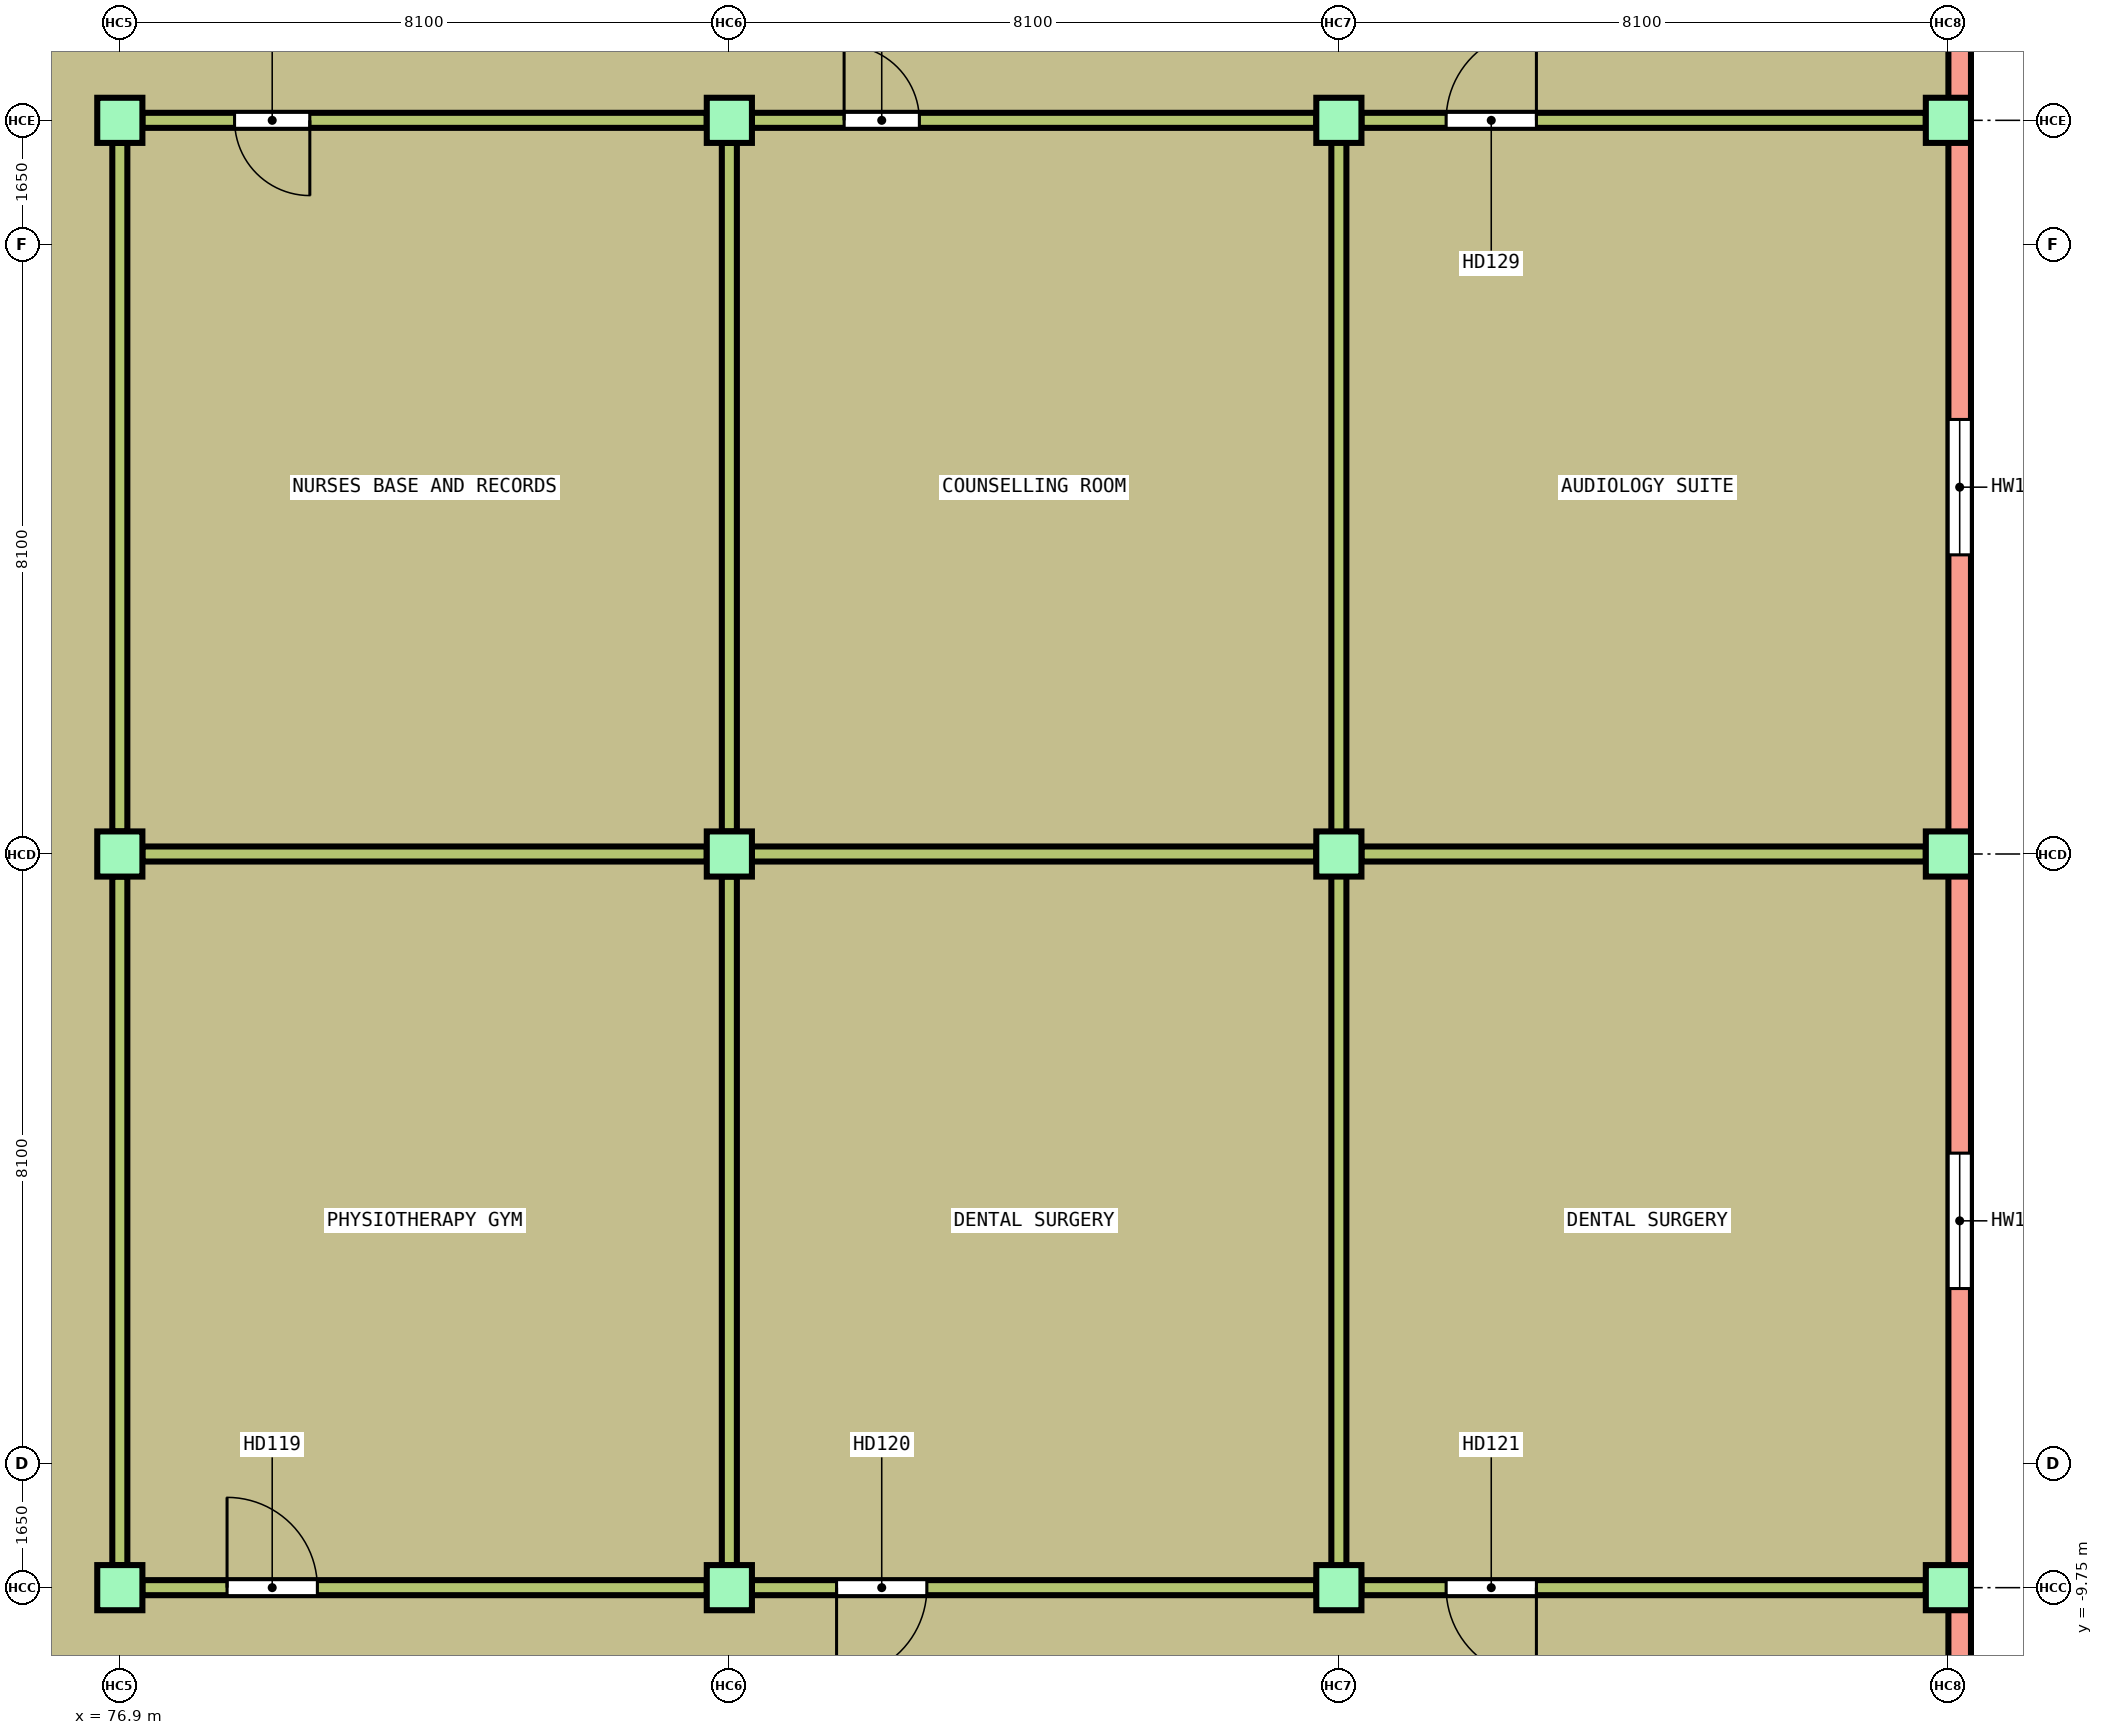
"""IFC4 building model, lengths in metres.
Left out: names, types, materials, properties, quantities, classifications, styles, units other than length and angle.
Written with IfcOpenShell. Run it as: python <this file> out.ifc"""

import sys

from ifc_helpers import new_model, si_unit, direction, frame, frame_2d, origin, origin_2d, place, context, subcontext, project, spatial, rectangle, extrude, element, fill, save


model = new_model("IFC4")
c1 = context("Model", 3, precision=1e-05, world=origin(), true_north=direction((0.0, 1.0)))
c2 = subcontext(c1, "Body", "Model", "MODEL_VIEW")
j1 = project(units=[si_unit("LENGTHUNIT", "METRE"), si_unit("PLANEANGLEUNIT", "RADIAN")], contexts=[c1])
p1 = place(None, origin())
s1 = spatial("IfcSite", under=j1, at=p1, CompositionType="ELEMENT")
p2 = place(p1, origin())
s2 = spatial("IfcBuilding", under=s1, at=p2, CompositionType="ELEMENT")
p3 = place(p2, frame((0.0, 0.0, 5.6)))
s3 = spatial("IfcBuildingStorey", under=s2, at=p3, CompositionType="ELEMENT", Elevation=5.6)
for number, where, z_axis, x_axis in (
    (1, (76.9, -9.75, 0.0), (0.0, 0.0, 1.0), (1.0, 0.0, 0.0)),
    (2, (85.0, -9.75, 0.0), (0.0, 0.0, 1.0), (1.0, 0.0, 0.0)),
    (3, (93.1, -9.75, 0.0), (0.0, 0.0, 1.0), (1.0, 0.0, 0.0)),
    (4, (101.2, -9.75, 0.0), (0.0, 0.0, 1.0), (1.0, 0.0, 0.0)),
    (5, (76.9, 0.0, 0.0), (0.0, 0.0, 1.0), (1.0, 0.0, 0.0)),
    (6, (85.0, 0.0, 0.0), (0.0, 0.0, 1.0), (1.0, 0.0, 0.0)),
    (7, (93.1, 0.0, 0.0), (0.0, 0.0, 1.0), (1.0, 0.0, 0.0)),
    (8, (101.2, 0.0, 0.0), (0.0, 0.0, 1.0), (1.0, 0.0, 0.0)),
    (9, (76.9, 9.75, 0.0), (0.0, 0.0, 1.0), (1.0, 0.0, 0.0)),
    (10, (85.0, 9.75, 0.0), (0.0, 0.0, 1.0), (1.0, 0.0, 0.0)),
    (11, (93.1, 9.75, 0.0), (0.0, 0.0, 1.0), (1.0, 0.0, 0.0)),
    (12, (101.2, 9.75, 0.0), (0.0, 0.0, 1.0), (1.0, 0.0, 0.0)),
):
    element("IfcColumn", number, at=place(p3, frame(where, z_axis=z_axis, x_axis=x_axis)), inside=s3, PredefinedType="COLUMN", context=c2, shape_type="SweptSolid", body=[
        extrude(rectangle(XDim=0.6, YDim=0.6, at=origin_2d()), origin(), (0.0, 0.0, 1.0), 4.6),
    ])
for number, where, z_axis, x_axis in (
    (13, (76.9, -9.45, 0.0), (0.0, 0.0, 1.0), (0.0, 1.0, 0.0)),
    (14, (76.9, 0.3, 0.0), (0.0, 0.0, 1.0), (0.0, 1.0, 0.0)),
    (15, (85.0, -9.45, 0.0), (0.0, 0.0, 1.0), (0.0, 1.0, 0.0)),
    (16, (85.0, 0.3, 0.0), (0.0, 0.0, 1.0), (0.0, 1.0, 0.0)),
):
    element("IfcWall", number, at=place(p3, frame(where, z_axis=z_axis, x_axis=x_axis)), inside=s3, PredefinedType="PARTITIONING", context=c2, shape_type="SweptSolid", body=[
        extrude(rectangle(XDim=9.15, YDim=0.2, at=frame_2d((4.575, 0.0))), origin(), (0.0, 0.0, 1.0), 3.8),
    ])
p4 = place(p3, frame((93.1, -9.75, 0.0), z_axis=(0.0, 0.0, 1.0), x_axis=(0.0, 1.0, 0.0)))
e17 = element("IfcWall", 17, at=p4, inside=s3, PredefinedType="PARTITIONING", context=c2, shape_type="SweptSolid", body=[
    extrude(rectangle(XDim=19.5, YDim=0.2, at=frame_2d((9.75, 0.0))), origin(), (0.0, 0.0, 1.0), 3.8),
])
p5 = place(p3, frame((101.35, 20.25, 0.0), z_axis=(0.0, 0.0, 1.0), x_axis=(0.0, -1.0, 0.0)))
e18 = element("IfcWall", 18, at=p5, inside=s3, PredefinedType="SOLIDWALL", context=c2, shape_type="SweptSolid", body=[
    extrude(rectangle(XDim=40.5, YDim=0.3, at=frame_2d((20.25, 0.0))), origin(), (0.0, 0.0, 1.0), 3.8),
])
p6 = place(p5, frame((36.15, 0.0, 1.5)))
e19 = element("IfcOpeningElement", 19, at=p6, cuts=e18, PredefinedType="OPENING", context=c2, shape_type="SweptSolid", body=[
    extrude(rectangle(XDim=1.2, YDim=0.9, at=frame_2d((0.6, 0.45))), frame((0.0, 0.16, 0.0), z_axis=(0.0, -1.0, 0.0), x_axis=(1.0, 0.0, 0.0)), (0.0, 0.0, 1.0), 0.32),
])
p7 = place(p5, frame((24.225, 0.0, 0.9)))
e20 = element("IfcOpeningElement", 20, at=p7, cuts=e18, PredefinedType="OPENING", context=c2, shape_type="SweptSolid", body=[
    extrude(rectangle(XDim=1.8, YDim=1.8, at=frame_2d((0.9, 0.9))), frame((0.0, 0.16, 0.0), z_axis=(0.0, -1.0, 0.0), x_axis=(1.0, 0.0, 0.0)), (0.0, 0.0, 1.0), 0.32),
])
p8 = place(p5, frame((14.475, 0.0, 0.9)))
e21 = element("IfcOpeningElement", 21, at=p8, cuts=e18, PredefinedType="OPENING", context=c2, shape_type="SweptSolid", body=[
    extrude(rectangle(XDim=1.8, YDim=1.8, at=frame_2d((0.9, 0.9))), frame((0.0, 0.16, 0.0), z_axis=(0.0, -1.0, 0.0), x_axis=(1.0, 0.0, 0.0)), (0.0, 0.0, 1.0), 0.32),
])
p9 = place(p3, frame((77.2, -9.75, 0.0), z_axis=(0.0, 0.0, 1.0), x_axis=(1.0, 0.0, 0.0)))
e22 = element("IfcWall", 22, at=p9, inside=s3, PredefinedType="PARTITIONING", context=c2, shape_type="SweptSolid", body=[
    extrude(rectangle(XDim=7.5, YDim=0.2, at=frame_2d((3.75, 0.0))), origin(), (0.0, 0.0, 1.0), 3.8),
])
p10 = place(p9, frame((1.125, 0.0, 0.0)))
e23 = element("IfcOpeningElement", 23, at=p10, cuts=e22, PredefinedType="OPENING", context=c2, shape_type="SweptSolid", body=[
    extrude(rectangle(XDim=1.2, YDim=2.1, at=frame_2d((0.6, 1.05))), frame((0.0, 0.11, 0.0), z_axis=(0.0, -1.0, 0.0), x_axis=(1.0, 0.0, 0.0)), (0.0, 0.0, 1.0), 0.22),
])
p11 = place(p3, frame((85.3, -9.75, 0.0), z_axis=(0.0, 0.0, 1.0), x_axis=(1.0, 0.0, 0.0)))
e24 = element("IfcWall", 24, at=p11, inside=s3, PredefinedType="PARTITIONING", context=c2, shape_type="SweptSolid", body=[
    extrude(rectangle(XDim=7.5, YDim=0.2, at=frame_2d((3.75, 0.0))), origin(), (0.0, 0.0, 1.0), 3.8),
])
p12 = place(p11, frame((1.125, 0.0, 0.0)))
e25 = element("IfcOpeningElement", 25, at=p12, cuts=e24, PredefinedType="OPENING", context=c2, shape_type="SweptSolid", body=[
    extrude(rectangle(XDim=1.2, YDim=2.1, at=frame_2d((0.6, 1.05))), frame((0.0, 0.11, 0.0), z_axis=(0.0, -1.0, 0.0), x_axis=(1.0, 0.0, 0.0)), (0.0, 0.0, 1.0), 0.22),
])
p13 = place(p3, frame((93.4, -9.75, 0.0), z_axis=(0.0, 0.0, 1.0), x_axis=(1.0, 0.0, 0.0)))
e26 = element("IfcWall", 26, at=p13, inside=s3, PredefinedType="PARTITIONING", context=c2, shape_type="SweptSolid", body=[
    extrude(rectangle(XDim=7.5, YDim=0.2, at=frame_2d((3.75, 0.0))), origin(), (0.0, 0.0, 1.0), 3.8),
])
p14 = place(p13, frame((1.125, 0.0, 0.0)))
e27 = element("IfcOpeningElement", 27, at=p14, cuts=e26, PredefinedType="OPENING", context=c2, shape_type="SweptSolid", body=[
    extrude(rectangle(XDim=1.2, YDim=2.1, at=frame_2d((0.6, 1.05))), frame((0.0, 0.11, 0.0), z_axis=(0.0, -1.0, 0.0), x_axis=(1.0, 0.0, 0.0)), (0.0, 0.0, 1.0), 0.22),
])
for number, where, z_axis, x_axis in (
    (28, (77.2, 0.0, 0.0), (0.0, 0.0, 1.0), (1.0, 0.0, 0.0)),
    (29, (85.3, 0.0, 0.0), (0.0, 0.0, 1.0), (1.0, 0.0, 0.0)),
    (30, (93.4, 0.0, 0.0), (0.0, 0.0, 1.0), (1.0, 0.0, 0.0)),
):
    element("IfcWall", number, at=place(p3, frame(where, z_axis=z_axis, x_axis=x_axis)), inside=s3, PredefinedType="PARTITIONING", context=c2, shape_type="SweptSolid", body=[
        extrude(rectangle(XDim=7.5, YDim=0.2, at=frame_2d((3.75, 0.0))), origin(), (0.0, 0.0, 1.0), 3.8),
    ])
p15 = place(p3, frame((77.2, 9.75, 0.0), z_axis=(0.0, 0.0, 1.0), x_axis=(1.0, 0.0, 0.0)))
e31 = element("IfcWall", 31, at=p15, inside=s3, PredefinedType="PARTITIONING", context=c2, shape_type="SweptSolid", body=[
    extrude(rectangle(XDim=7.5, YDim=0.2, at=frame_2d((3.75, 0.0))), origin(), (0.0, 0.0, 1.0), 3.8),
])
p16 = place(p15, frame((1.225, 0.0, 0.0)))
e32 = element("IfcOpeningElement", 32, at=p16, cuts=e31, PredefinedType="OPENING", context=c2, shape_type="SweptSolid", body=[
    extrude(rectangle(XDim=1.0, YDim=2.1, at=frame_2d((0.5, 1.05))), frame((0.0, 0.11, 0.0), z_axis=(0.0, -1.0, 0.0), x_axis=(1.0, 0.0, 0.0)), (0.0, 0.0, 1.0), 0.22),
])
p17 = place(p3, frame((85.3, 9.75, 0.0), z_axis=(0.0, 0.0, 1.0), x_axis=(1.0, 0.0, 0.0)))
e33 = element("IfcWall", 33, at=p17, inside=s3, PredefinedType="PARTITIONING", context=c2, shape_type="SweptSolid", body=[
    extrude(rectangle(XDim=7.5, YDim=0.2, at=frame_2d((3.75, 0.0))), origin(), (0.0, 0.0, 1.0), 3.8),
])
p18 = place(p17, frame((1.225, 0.0, 0.0)))
e34 = element("IfcOpeningElement", 34, at=p18, cuts=e33, PredefinedType="OPENING", context=c2, shape_type="SweptSolid", body=[
    extrude(rectangle(XDim=1.0, YDim=2.1, at=frame_2d((0.5, 1.05))), frame((0.0, 0.11, 0.0), z_axis=(0.0, -1.0, 0.0), x_axis=(1.0, 0.0, 0.0)), (0.0, 0.0, 1.0), 0.22),
])
p19 = place(p3, frame((93.4, 9.75, 0.0), z_axis=(0.0, 0.0, 1.0), x_axis=(1.0, 0.0, 0.0)))
e35 = element("IfcWall", 35, at=p19, inside=s3, PredefinedType="PARTITIONING", context=c2, shape_type="SweptSolid", body=[
    extrude(rectangle(XDim=7.5, YDim=0.2, at=frame_2d((3.75, 0.0))), origin(), (0.0, 0.0, 1.0), 3.8),
])
p20 = place(p19, frame((1.125, 0.0, 0.0)))
e36 = element("IfcOpeningElement", 36, at=p20, cuts=e35, PredefinedType="OPENING", context=c2, shape_type="SweptSolid", body=[
    extrude(rectangle(XDim=1.2, YDim=2.1, at=frame_2d((0.6, 1.05))), frame((0.0, 0.11, 0.0), z_axis=(0.0, -1.0, 0.0), x_axis=(1.0, 0.0, 0.0)), (0.0, 0.0, 1.0), 0.22),
])
p21 = place(p10, origin())
e37 = element("IfcDoor", 37, at=p21, inside=s3, OperationType="SINGLE_SWING_RIGHT", PredefinedType="DOOR", context=c2, shape_type="SweptSolid", body=[
    extrude(rectangle(XDim=1.2, YDim=2.1, at=frame_2d((0.6, 1.05))), frame((0.0, 0.025, 0.0), z_axis=(0.0, -1.0, 0.0), x_axis=(1.0, 0.0, 0.0)), (0.0, 0.0, 1.0), 0.05),
])
fill(e23, e37)
p22 = place(p12, origin())
e38 = element("IfcDoor", 38, at=p22, inside=s3, OperationType="SINGLE_SWING_LEFT", PredefinedType="DOOR", context=c2, shape_type="SweptSolid", body=[
    extrude(rectangle(XDim=1.2, YDim=2.1, at=frame_2d((0.6, 1.05))), frame((0.0, 0.025, 0.0), z_axis=(0.0, -1.0, 0.0), x_axis=(1.0, 0.0, 0.0)), (0.0, 0.0, 1.0), 0.05),
])
fill(e25, e38)
p23 = place(p14, origin())
e39 = element("IfcDoor", 39, at=p23, inside=s3, OperationType="SINGLE_SWING_RIGHT", PredefinedType="DOOR", context=c2, shape_type="SweptSolid", body=[
    extrude(rectangle(XDim=1.2, YDim=2.1, at=frame_2d((0.6, 1.05))), frame((0.0, 0.025, 0.0), z_axis=(0.0, -1.0, 0.0), x_axis=(1.0, 0.0, 0.0)), (0.0, 0.0, 1.0), 0.05),
])
fill(e27, e39)
p24 = place(p16, origin())
e40 = element("IfcDoor", 40, at=p24, inside=s3, OperationType="SINGLE_SWING_RIGHT", PredefinedType="DOOR", context=c2, shape_type="SweptSolid", body=[
    extrude(rectangle(XDim=1.0, YDim=2.1, at=frame_2d((0.5, 1.05))), frame((0.0, 0.025, 0.0), z_axis=(0.0, -1.0, 0.0), x_axis=(1.0, 0.0, 0.0)), (0.0, 0.0, 1.0), 0.05),
])
fill(e32, e40)
p25 = place(p18, origin())
e41 = element("IfcDoor", 41, at=p25, inside=s3, OperationType="SINGLE_SWING_LEFT", PredefinedType="DOOR", context=c2, shape_type="SweptSolid", body=[
    extrude(rectangle(XDim=1.0, YDim=2.1, at=frame_2d((0.5, 1.05))), frame((0.0, 0.025, 0.0), z_axis=(0.0, -1.0, 0.0), x_axis=(1.0, 0.0, 0.0)), (0.0, 0.0, 1.0), 0.05),
])
fill(e34, e41)
p26 = place(p20, origin())
e42 = element("IfcDoor", 42, at=p26, inside=s3, OperationType="SINGLE_SWING_RIGHT", PredefinedType="DOOR", context=c2, shape_type="SweptSolid", body=[
    extrude(rectangle(XDim=1.2, YDim=2.1, at=frame_2d((0.6, 1.05))), frame((0.0, 0.025, 0.0), z_axis=(0.0, -1.0, 0.0), x_axis=(1.0, 0.0, 0.0)), (0.0, 0.0, 1.0), 0.05),
])
fill(e36, e42)
p27 = place(p7, origin())
e43 = element("IfcWindow", 43, at=p27, inside=s3, PartitioningType="SINGLE_PANEL", PredefinedType="WINDOW", context=c2, shape_type="SweptSolid", body=[
    extrude(rectangle(XDim=1.8, YDim=1.8, at=frame_2d((0.9, 0.9))), frame((0.0, 0.03, 0.0), z_axis=(0.0, -1.0, 0.0), x_axis=(1.0, 0.0, 0.0)), (0.0, 0.0, 1.0), 0.06),
])
fill(e20, e43)
p28 = place(p8, origin())
e44 = element("IfcWindow", 44, at=p28, inside=s3, PartitioningType="SINGLE_PANEL", PredefinedType="WINDOW", context=c2, shape_type="SweptSolid", body=[
    extrude(rectangle(XDim=1.8, YDim=1.8, at=frame_2d((0.9, 0.9))), frame((0.0, 0.03, 0.0), z_axis=(0.0, -1.0, 0.0), x_axis=(1.0, 0.0, 0.0)), (0.0, 0.0, 1.0), 0.06),
])
fill(e21, e44)
save(model, sys.argv[1])
